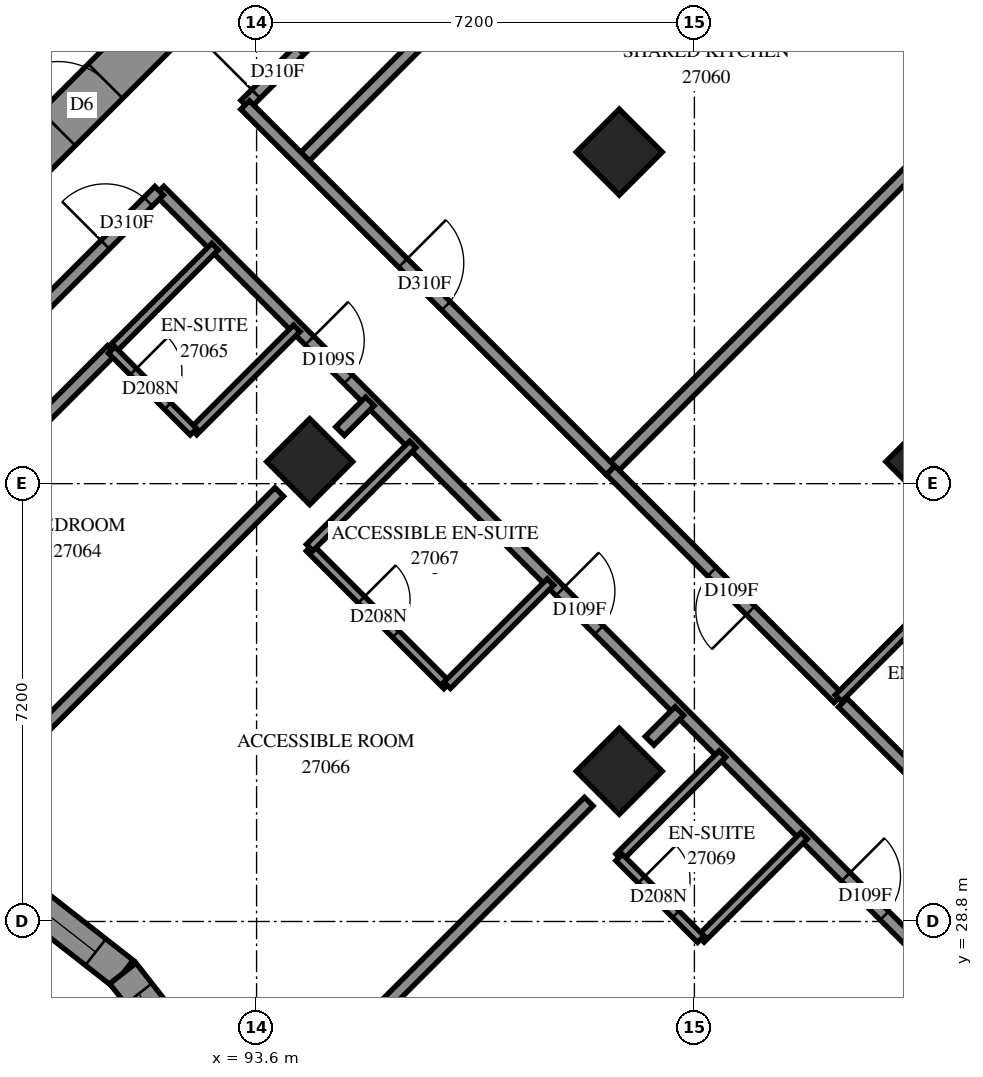
"""IFC4 building model, lengths in metres.
Left out: names, types, materials, properties, quantities, classifications, styles, units other than length and angle.
Written with IfcOpenShell. Run it as: python <this file> out.ifc"""

import sys

from ifc_helpers import new_model, si_unit, direction, frame, frame_2d, origin, origin_2d, place, context, subcontext, project, spatial, polyline, rectangle, outline, extrude, element, fill, save


model = new_model("IFC4")
c1 = context("Model", 3, precision=1e-05, world=origin(), true_north=direction((0.0, 1.0)))
c2 = subcontext(c1, "Body", "Model", "MODEL_VIEW")
j1 = project(units=[si_unit("LENGTHUNIT", "METRE"), si_unit("PLANEANGLEUNIT", "RADIAN")], contexts=[c1])
p1 = place(None, origin())
s1 = spatial("IfcSite", under=j1, at=p1, CompositionType="ELEMENT")
p2 = place(p1, origin())
s2 = spatial("IfcBuilding", under=s1, at=p2, CompositionType="ELEMENT")
p3 = place(p2, frame((0.0, 0.0, 101.6)))
s3 = spatial("IfcBuildingStorey", under=s2, at=p3, CompositionType="ELEMENT", Elevation=101.6)
for number, where, z_axis, x_axis in (
    (1, (99.565, 41.453, 0.0), (0.0, 0.0, 1.0), (0.707, -0.707, 0.0)),
    (2, (94.474, 36.362, 0.0), (0.0, 0.0, 1.0), (0.707, -0.707, 0.0)),
    (3, (104.656, 36.362, 0.0), (0.0, 0.0, 1.0), (0.707, -0.707, 0.0)),
    (4, (99.565, 31.271, 0.0), (0.0, 0.0, 1.0), (0.707, -0.707, 0.0)),
):
    element("IfcColumn", number, at=place(p3, frame(where, z_axis=z_axis, x_axis=x_axis)), inside=s3, PredefinedType="COLUMN", context=c2, shape_type="SweptSolid", body=[
        extrude(rectangle(XDim=1.0, YDim=1.0, at=origin_2d()), origin(), (0.0, 0.0, 1.0), 3.1),
    ])
p4 = place(p3, frame((87.12, 38.625, -0.3), z_axis=(0.0, 0.0, 1.0), x_axis=(0.7071067812, 0.7071067812, 0.0)))
e5 = element("IfcWall", 5, at=p4, inside=s3, PredefinedType="SHEAR", context=c2, shape_type="SweptSolid", body=[
    extrude(rectangle(XDim=14.4, YDim=0.8, at=frame_2d((7.2, 0.0))), origin(), (0.0, 0.0, 1.0), 2.7),
])
p5 = place(p4, frame((4.55, 0.0, 0.3)))
e6 = element("IfcOpeningElement", 6, at=p5, cuts=e5, PredefinedType="OPENING", context=c2, shape_type="SweptSolid", body=[
    extrude(rectangle(XDim=1.1, YDim=2.1, at=frame_2d((0.55, 1.05))), frame((0.0, 0.41, 0.0), z_axis=(0.0, -1.0, 0.0), x_axis=(1.0, 0.0, 0.0)), (0.0, 0.0, 1.0), 0.82),
])
p6 = place(p4, frame((11.35, 0.0, 0.3)))
e7 = element("IfcOpeningElement", 7, at=p6, cuts=e5, PredefinedType="OPENING", context=c2, shape_type="SweptSolid", body=[
    extrude(rectangle(XDim=1.1, YDim=2.1, at=frame_2d((0.55, 1.05))), frame((0.0, 0.41, 0.0), z_axis=(0.0, -1.0, 0.0), x_axis=(1.0, 0.0, 0.0)), (0.0, 0.0, 1.0), 0.82),
])
p7 = place(p3, frame((88.274, 30.392, 0.0), z_axis=(0.0, 0.0, 1.0), x_axis=(0.7877191588, -0.6160345176, 0.0)))
e8 = element("IfcWall", 8, at=p7, inside=s3, PredefinedType="SOLIDWALL", context=c2, shape_type="SweptSolid", body=[
    extrude(outline(polyline([(-0.034, -0.275), (3.936, -0.275), (4.004, 0.275), (0.034, 0.275), (-0.034, -0.275)])), origin(), (0.0, 0.0, 1.0), 3.1),
])
p8 = place(p7, frame((0.602, 0.0, 0.5)))
e9 = element("IfcOpeningElement", 9, at=p8, cuts=e8, PredefinedType="OPENING", context=c2, shape_type="SweptSolid", body=[
    extrude(rectangle(XDim=1.3, YDim=2.45, at=frame_2d((0.65, 1.225))), frame((0.0, 0.285, 0.0), z_axis=(0.0, -1.0, 0.0), x_axis=(1.0, 0.0, 0.0)), (0.0, 0.0, 1.0), 0.57),
])
p9 = place(p7, frame((2.102, 0.0, 0.5)))
e10 = element("IfcOpeningElement", 10, at=p9, cuts=e8, PredefinedType="OPENING", context=c2, shape_type="SweptSolid", body=[
    extrude(rectangle(XDim=1.3, YDim=2.45, at=frame_2d((0.65, 1.225))), frame((0.0, 0.285, 0.0), z_axis=(0.0, -1.0, 0.0), x_axis=(1.0, 0.0, 0.0)), (0.0, 0.0, 1.0), 0.57),
])
p10 = place(p3, frame((91.401, 27.947, 0.0), z_axis=(0.0, 0.0, 1.0), x_axis=(0.6160345176, -0.7877191588, 0.0)))
e11 = element("IfcWall", 11, at=p10, inside=s3, PredefinedType="SOLIDWALL", context=c2, shape_type="SweptSolid", body=[
    extrude(outline(polyline([(0.034, -0.275), (4.004, -0.275), (3.936, 0.275), (-0.034, 0.275), (0.034, -0.275)])), origin(), (0.0, 0.0, 1.0), 3.1),
])
p11 = place(p10, frame((0.424, 0.0, 0.5)))
e12 = element("IfcOpeningElement", 12, at=p11, cuts=e11, PredefinedType="OPENING", context=c2, shape_type="SweptSolid", body=[
    extrude(rectangle(XDim=1.3, YDim=2.45, at=frame_2d((0.65, 1.225))), frame((0.0, 0.285, 0.0), z_axis=(0.0, -1.0, 0.0), x_axis=(1.0, 0.0, 0.0)), (0.0, 0.0, 1.0), 0.57),
])
p12 = place(p10, frame((1.924, 0.0, 0.5)))
e13 = element("IfcOpeningElement", 13, at=p12, cuts=e11, PredefinedType="OPENING", context=c2, shape_type="SweptSolid", body=[
    extrude(rectangle(XDim=1.3, YDim=2.45, at=frame_2d((0.65, 1.225))), frame((0.0, 0.285, 0.0), z_axis=(0.0, -1.0, 0.0), x_axis=(1.0, 0.0, 0.0)), (0.0, 0.0, 1.0), 0.57),
])
p13 = place(p3, frame((92.004, 40.819, 0.0), z_axis=(0.0, 0.0, 1.0), x_axis=(0.7071067812, -0.7071067812, 0.0)))
e14 = element("IfcWall", 14, at=p13, inside=s3, PredefinedType="PARTITIONING", context=c2, shape_type="SweptSolid", body=[
    extrude(rectangle(XDim=19.298, YDim=0.2, at=frame_2d((9.649, 0.0))), origin(), (0.0, 0.0, 1.0), 3.1),
])
p14 = place(p13, frame((3.489, 0.0, 0.0)))
e15 = element("IfcOpeningElement", 15, at=p14, cuts=e14, PredefinedType="OPENING", context=c2, shape_type="SweptSolid", body=[
    extrude(rectangle(XDim=0.9, YDim=2.1, at=frame_2d((0.45, 1.05))), frame((0.0, 0.11, 0.0), z_axis=(0.0, -1.0, 0.0), x_axis=(1.0, 0.0, 0.0)), (0.0, 0.0, 1.0), 0.22),
])
p15 = place(p13, frame((9.319, 0.0, 0.0)))
e16 = element("IfcOpeningElement", 16, at=p15, cuts=e14, PredefinedType="OPENING", context=c2, shape_type="SweptSolid", body=[
    extrude(rectangle(XDim=0.9, YDim=2.1, at=frame_2d((0.45, 1.05))), frame((0.0, 0.11, 0.0), z_axis=(0.0, -1.0, 0.0), x_axis=(1.0, 0.0, 0.0)), (0.0, 0.0, 1.0), 0.22),
])
p16 = place(p13, frame((15.961, 0.0, 0.0)))
e17 = element("IfcOpeningElement", 17, at=p16, cuts=e14, PredefinedType="OPENING", context=c2, shape_type="SweptSolid", body=[
    extrude(rectangle(XDim=0.9, YDim=2.1, at=frame_2d((0.45, 1.05))), frame((0.0, 0.11, 0.0), z_axis=(0.0, -1.0, 0.0), x_axis=(1.0, 0.0, 0.0)), (0.0, 0.0, 1.0), 0.22),
])
p17 = place(p3, frame((99.423, 36.221, 0.0), z_axis=(0.0, 0.0, 1.0), x_axis=(0.7071067812, 0.7071067812, 0.0)))
e18 = element("IfcWall", 18, at=p17, inside=s3, PredefinedType="PARTITIONING", context=c2, shape_type="SweptSolid", body=[
    extrude(rectangle(XDim=12.072, YDim=0.2, at=frame_2d((6.036, 0.0))), origin(), (0.0, 0.0, 1.0), 3.1),
])
p18 = place(p3, frame((94.331, 41.313, 0.0), z_axis=(0.0, 0.0, 1.0), x_axis=(0.7071109413, 0.7071026211, 0.0)))
e19 = element("IfcWall", 19, at=p18, inside=s3, PredefinedType="PARTITIONING", context=c2, shape_type="SweptSolid", body=[
    extrude(rectangle(XDim=12.019, YDim=0.2, at=frame_2d((6.01, 0.0))), origin(), (0.0, 0.0, 1.0), 3.1),
])
p19 = place(p3, frame((93.413, 42.233, 0.0), z_axis=(0.0, 0.0, 1.0), x_axis=(0.7071067812, 0.7071067812, 0.0)))
e20 = element("IfcWall", 20, at=p19, inside=s3, PredefinedType="PARTITIONING", context=c2, shape_type="SweptSolid", body=[
    extrude(rectangle(XDim=9.699, YDim=0.2, at=frame_2d((4.849, 0.0))), origin(), (0.0, 0.0, 1.0), 3.1),
])
p20 = place(p19, frame((0.249, 0.0, 0.0)))
e21 = element("IfcOpeningElement", 21, at=p20, cuts=e20, PredefinedType="OPENING", context=c2, shape_type="SweptSolid", body=[
    extrude(rectangle(XDim=1.0, YDim=2.1, at=frame_2d((0.5, 1.05))), frame((0.0, 0.11, 0.0), z_axis=(0.0, -1.0, 0.0), x_axis=(1.0, 0.0, 0.0)), (0.0, 0.0, 1.0), 0.22),
])
p21 = place(p3, frame((93.411, 42.227, 0.0), z_axis=(0.0, 0.0, 1.0), x_axis=(0.7071067812, -0.7071067812, 0.0)))
e22 = element("IfcWall", 22, at=p21, inside=s3, PredefinedType="PARTITIONING", context=c2, shape_type="SweptSolid", body=[
    extrude(rectangle(XDim=8.499, YDim=0.2, at=frame_2d((4.25, 0.0))), origin(), (0.0, 0.0, 1.0), 3.1),
])
p22 = place(p21, frame((3.672, 0.0, 0.0)))
e23 = element("IfcOpeningElement", 23, at=p22, cuts=e22, PredefinedType="OPENING", context=c2, shape_type="SweptSolid", body=[
    extrude(rectangle(XDim=1.0, YDim=2.1, at=frame_2d((0.5, 1.05))), frame((0.0, 0.11, 0.0), z_axis=(0.0, -1.0, 0.0), x_axis=(1.0, 0.0, 0.0)), (0.0, 0.0, 1.0), 0.22),
])
p23 = place(p3, frame((86.835, 35.655, 0.0), z_axis=(0.0, 0.0, 1.0), x_axis=(0.7071067812, 0.7071067812, 0.0)))
e24 = element("IfcWall", 24, at=p23, inside=s3, PredefinedType="PARTITIONING", context=c2, shape_type="SweptSolid", body=[
    extrude(rectangle(XDim=7.3, YDim=0.2, at=frame_2d((3.65, 0.0))), origin(), (0.0, 0.0, 1.0), 3.1),
])
p24 = place(p23, frame((6.046, 0.0, 0.0)))
e25 = element("IfcOpeningElement", 25, at=p24, cuts=e24, PredefinedType="OPENING", context=c2, shape_type="SweptSolid", body=[
    extrude(rectangle(XDim=1.0, YDim=2.1, at=frame_2d((0.5, 1.05))), frame((0.0, 0.11, 0.0), z_axis=(0.0, -1.0, 0.0), x_axis=(1.0, 0.0, 0.0)), (0.0, 0.0, 1.0), 0.22),
])
p25 = place(p3, frame((86.337, 33.315, 0.0), z_axis=(0.0, 0.0, 1.0), x_axis=(0.7069692223, 0.7072443133, 0.0)))
e26 = element("IfcWall", 26, at=p25, inside=s3, PredefinedType="PARTITIONING", context=c2, shape_type="SweptSolid", body=[
    extrude(rectangle(XDim=6.907, YDim=0.2, at=frame_2d((3.453, 0.0))), origin(), (0.0, 0.0, 1.0), 3.1),
])
p26 = place(p3, frame((89.881, 31.771, 0.0), z_axis=(0.0, 0.0, 1.0), x_axis=(0.7071067812, 0.7071067812, 0.0)))
e27 = element("IfcWall", 27, at=p26, inside=s3, PredefinedType="PARTITIONING", context=c2, shape_type="SweptSolid", body=[
    extrude(rectangle(XDim=5.787, YDim=0.2, at=frame_2d((2.893, 0.0))), origin(), (0.0, 0.0, 1.0), 3.1),
])
p27 = place(p3, frame((94.973, 26.681, 0.0), z_axis=(0.0, 0.0, 1.0), x_axis=(0.7071067812, 0.7071067812, 0.0)))
e28 = element("IfcWall", 28, at=p27, inside=s3, PredefinedType="PARTITIONING", context=c2, shape_type="SweptSolid", body=[
    extrude(rectangle(XDim=5.784, YDim=0.2, at=frame_2d((2.892, 0.0))), origin(), (0.0, 0.0, 1.0), 3.1),
])
p28 = place(p3, frame((103.239, 32.399, 0.0), z_axis=(0.0, 0.0, 1.0), x_axis=(0.7071067812, -0.7071067812, 0.0)))
e29 = element("IfcWall", 29, at=p28, inside=s3, PredefinedType="PARTITIONING", context=c2, shape_type="SweptSolid", body=[
    extrude(rectangle(XDim=5.399, YDim=0.2, at=frame_2d((2.7, 0.0))), origin(), (0.0, 0.0, 1.0), 3.1),
])
p29 = place(p28, frame((2.15, 0.0, 0.0)))
e30 = element("IfcOpeningElement", 30, at=p29, cuts=e29, PredefinedType="OPENING", context=c2, shape_type="SweptSolid", body=[
    extrude(rectangle(XDim=0.9, YDim=2.1, at=frame_2d((0.45, 1.05))), frame((0.0, 0.11, 0.0), z_axis=(0.0, -1.0, 0.0), x_axis=(1.0, 0.0, 0.0)), (0.0, 0.0, 1.0), 0.22),
])
p30 = place(p3, frame((103.168, 32.47, 0.0), z_axis=(0.0, 0.0, 1.0), x_axis=(-0.7067858967, 0.7074275201, 0.0)))
e31 = element("IfcWall", 31, at=p30, inside=s3, PredefinedType="PARTITIONING", context=c2, shape_type="SweptSolid", body=[
    extrude(rectangle(XDim=5.299, YDim=0.2, at=frame_2d((2.65, 0.0))), origin(), (0.0, 0.0, 1.0), 3.1),
])
p31 = place(p30, frame((2.043, 0.0, 0.0)))
e32 = element("IfcOpeningElement", 32, at=p31, cuts=e31, PredefinedType="OPENING", context=c2, shape_type="SweptSolid", body=[
    extrude(rectangle(XDim=0.9, YDim=2.1, at=frame_2d((0.45, 1.05))), frame((0.0, 0.11, 0.0), z_axis=(0.0, -1.0, 0.0), x_axis=(1.0, 0.0, 0.0)), (0.0, 0.0, 1.0), 0.22),
])
p32 = place(p3, frame((94.471, 34.945, 0.0), z_axis=(0.0, 0.0, 1.0), x_axis=(0.7067942478, -0.7074191764, 0.0)))
e33 = element("IfcWall", 33, at=p32, inside=s3, PredefinedType="PARTITIONING", context=c2, shape_type="SweptSolid", body=[
    extrude(rectangle(XDim=3.2, YDim=0.15, at=frame_2d((1.6, 0.0))), origin(), (0.0, 0.0, 1.0), 3.1),
])
p33 = place(p32, frame((1.206, 0.0, 0.0)))
e34 = element("IfcOpeningElement", 34, at=p33, cuts=e33, PredefinedType="OPENING", context=c2, shape_type="SweptSolid", body=[
    extrude(rectangle(XDim=0.8, YDim=2.1, at=frame_2d((0.4, 1.05))), frame((0.0, 0.085, 0.0), z_axis=(0.0, -1.0, 0.0), x_axis=(1.0, 0.0, 0.0)), (0.0, 0.0, 1.0), 0.17),
])
for number, where, z_axis, x_axis in (
    (35, (92.563, 36.857, 0.0), (0.0, 0.0, 1.0), (0.707, 0.707, 0.0)),
    (36, (91.219, 38.201, 0.0), (0.0, 0.0, 1.0), (0.707, 0.707, 0.0)),
    (37, (96.735, 32.685, 0.0), (0.0, 0.0, 1.0), (0.707, 0.707, 0.0)),
    (38, (103.169, 32.473, 0.0), (0.0, 0.0, 1.0), (0.707, 0.707, 0.0)),
    (39, (99.563, 29.857, 0.0), (0.0, 0.0, 1.0), (0.707, 0.707, 0.0)),
    (40, (100.907, 28.513, 0.0), (0.0, 0.0, 1.0), (0.707, 0.707, 0.0)),
):
    element("IfcWall", number, at=place(p3, frame(where, z_axis=z_axis, x_axis=x_axis)), inside=s3, PredefinedType="PARTITIONING", context=c2, shape_type="SweptSolid", body=[
        extrude(rectangle(XDim=2.401, YDim=0.15, at=frame_2d((1.201, 0.0))), origin(), (0.0, 0.0, 1.0), 3.1),
    ])
p34 = place(p3, frame((94.473, 34.949, 0.0), z_axis=(0.0, 0.0, 1.0), x_axis=(0.7071067812, 0.7071067812, 0.0)))
e41 = element("IfcWall", 41, at=p34, inside=s3, PredefinedType="PARTITIONING", context=c2, shape_type="SweptSolid", body=[
    extrude(rectangle(XDim=2.398, YDim=0.15, at=frame_2d((1.199, 0.0))), origin(), (0.0, 0.0, 1.0), 3.1),
])
p35 = place(p3, frame((99.561, 29.853, 0.0), z_axis=(0.0, 0.0, 1.0), x_axis=(0.7071067812, -0.7071067812, 0.0)))
e42 = element("IfcWall", 42, at=p35, inside=s3, PredefinedType="PARTITIONING", context=c2, shape_type="SweptSolid", body=[
    extrude(rectangle(XDim=1.901, YDim=0.15, at=frame_2d((0.95, 0.0))), origin(), (0.0, 0.0, 1.0), 3.1),
])
p36 = place(p35, frame((0.519, 0.0, 0.0)))
e43 = element("IfcOpeningElement", 43, at=p36, cuts=e42, PredefinedType="OPENING", context=c2, shape_type="SweptSolid", body=[
    extrude(rectangle(XDim=0.8, YDim=2.1, at=frame_2d((0.4, 1.05))), frame((0.0, 0.085, 0.0), z_axis=(0.0, -1.0, 0.0), x_axis=(1.0, 0.0, 0.0)), (0.0, 0.0, 1.0), 0.17),
])
p37 = place(p3, frame((91.217, 38.197, 0.0), z_axis=(0.0, 0.0, 1.0), x_axis=(0.7071067812, -0.7071067812, 0.0)))
e44 = element("IfcWall", 44, at=p37, inside=s3, PredefinedType="PARTITIONING", context=c2, shape_type="SweptSolid", body=[
    extrude(rectangle(XDim=1.901, YDim=0.15, at=frame_2d((0.95, 0.0))), origin(), (0.0, 0.0, 1.0), 3.1),
])
p38 = place(p37, frame((0.502, 0.0, 0.0)))
e45 = element("IfcOpeningElement", 45, at=p38, cuts=e44, PredefinedType="OPENING", context=c2, shape_type="SweptSolid", body=[
    extrude(rectangle(XDim=0.8, YDim=2.1, at=frame_2d((0.4, 1.05))), frame((0.0, 0.085, 0.0), z_axis=(0.0, -1.0, 0.0), x_axis=(1.0, 0.0, 0.0)), (0.0, 0.0, 1.0), 0.17),
])
for number, where, z_axis, x_axis in (
    (46, (94.973, 36.863, 0.0), (0.0, 0.0, 1.0), (0.707, 0.707, 0.0)),
    (47, (100.063, 31.771, 0.0), (0.0, 0.0, 1.0), (0.707, 0.707, 0.0)),
):
    element("IfcWall", number, at=place(p3, frame(where, z_axis=z_axis, x_axis=x_axis)), inside=s3, PredefinedType="PARTITIONING", context=c2, shape_type="SweptSolid", body=[
        extrude(rectangle(XDim=0.693, YDim=0.2, at=frame_2d((0.346, 0.0))), origin(), (0.0, 0.0, 1.0), 3.1),
    ])
p39 = place(p9, origin())
e48 = element("IfcWindow", 48, at=p39, inside=s3, PartitioningType="SINGLE_PANEL", PredefinedType="WINDOW", context=c2, shape_type="SweptSolid", body=[
    extrude(rectangle(XDim=1.3, YDim=2.45, at=frame_2d((0.65, 1.225))), frame((0.0, 0.155, 0.0), z_axis=(0.0, -1.0, 0.0), x_axis=(1.0, 0.0, 0.0)), (0.0, 0.0, 1.0), 0.06),
])
fill(e10, e48)
p40 = place(p11, origin())
e49 = element("IfcWindow", 49, at=p40, inside=s3, PartitioningType="SINGLE_PANEL", PredefinedType="WINDOW", context=c2, shape_type="SweptSolid", body=[
    extrude(rectangle(XDim=1.3, YDim=2.45, at=frame_2d((0.65, 1.225))), frame((0.0, 0.155, 0.0), z_axis=(0.0, -1.0, 0.0), x_axis=(1.0, 0.0, 0.0)), (0.0, 0.0, 1.0), 0.06),
])
fill(e12, e49)
p41 = place(p5, origin())
e50 = element("IfcDoor", 50, at=p41, inside=s3, OperationType="DOUBLE_DOOR_SINGLE_SWING", PredefinedType="DOOR", context=c2, shape_type="SweptSolid", body=[
    extrude(rectangle(XDim=1.1, YDim=2.1, at=frame_2d((0.55, 1.05))), frame((0.0, 0.025, 0.0), z_axis=(0.0, -1.0, 0.0), x_axis=(1.0, 0.0, 0.0)), (0.0, 0.0, 1.0), 0.05),
])
fill(e6, e50)
p42 = place(p20, origin())
e51 = element("IfcDoor", 51, at=p42, inside=s3, OperationType="SINGLE_SWING_LEFT", PredefinedType="DOOR", context=c2, shape_type="SweptSolid", body=[
    extrude(rectangle(XDim=1.0, YDim=2.1, at=frame_2d((0.5, 1.05))), frame((0.0, 0.025, 0.0), z_axis=(0.0, -1.0, 0.0), x_axis=(1.0, 0.0, 0.0)), (0.0, 0.0, 1.0), 0.05),
])
fill(e21, e51)
p43 = place(p22, origin())
e52 = element("IfcDoor", 52, at=p43, inside=s3, OperationType="SINGLE_SWING_RIGHT", PredefinedType="DOOR", context=c2, shape_type="SweptSolid", body=[
    extrude(rectangle(XDim=1.0, YDim=2.1, at=frame_2d((0.5, 1.05))), frame((0.0, 0.025, 0.0), z_axis=(0.0, -1.0, 0.0), x_axis=(1.0, 0.0, 0.0)), (0.0, 0.0, 1.0), 0.05),
])
fill(e23, e52)
p44 = place(p31, origin())
e53 = element("IfcDoor", 53, at=p44, inside=s3, OperationType="SINGLE_SWING_RIGHT", PredefinedType="DOOR", context=c2, shape_type="SweptSolid", body=[
    extrude(rectangle(XDim=0.9, YDim=2.1, at=frame_2d((0.45, 1.05))), frame((0.0, 0.025, 0.0), z_axis=(0.0, -1.0, 0.0), x_axis=(1.0, 0.0, 0.0)), (0.0, 0.0, 1.0), 0.05),
])
fill(e32, e53)
p45 = place(p24, origin())
e54 = element("IfcDoor", 54, at=p45, inside=s3, OperationType="SINGLE_SWING_RIGHT", PredefinedType="DOOR", context=c2, shape_type="SweptSolid", body=[
    extrude(rectangle(XDim=1.0, YDim=2.1, at=frame_2d((0.5, 1.05))), frame((0.0, 0.025, 0.0), z_axis=(0.0, -1.0, 0.0), x_axis=(1.0, 0.0, 0.0)), (0.0, 0.0, 1.0), 0.05),
])
fill(e25, e54)
p46 = place(p14, origin())
e55 = element("IfcDoor", 55, at=p46, inside=s3, OperationType="SINGLE_SWING_LEFT", PredefinedType="DOOR", context=c2, shape_type="SweptSolid", body=[
    extrude(rectangle(XDim=0.9, YDim=2.1, at=frame_2d((0.45, 1.05))), frame((0.0, 0.025, 0.0), z_axis=(0.0, -1.0, 0.0), x_axis=(1.0, 0.0, 0.0)), (0.0, 0.0, 1.0), 0.05),
])
fill(e15, e55)
p47 = place(p38, origin())
e56 = element("IfcDoor", 56, at=p47, inside=s3, OperationType="SINGLE_SWING_RIGHT", PredefinedType="DOOR", context=c2, shape_type="SweptSolid", body=[
    extrude(rectangle(XDim=0.8, YDim=2.1, at=frame_2d((0.4, 1.05))), frame((0.0, 0.025, 0.0), z_axis=(0.0, -1.0, 0.0), x_axis=(1.0, 0.0, 0.0)), (0.0, 0.0, 1.0), 0.05),
])
fill(e45, e56)
p48 = place(p15, origin())
e57 = element("IfcDoor", 57, at=p48, inside=s3, OperationType="SINGLE_SWING_RIGHT", PredefinedType="DOOR", context=c2, shape_type="SweptSolid", body=[
    extrude(rectangle(XDim=0.9, YDim=2.1, at=frame_2d((0.45, 1.05))), frame((0.0, 0.025, 0.0), z_axis=(0.0, -1.0, 0.0), x_axis=(1.0, 0.0, 0.0)), (0.0, 0.0, 1.0), 0.05),
])
fill(e16, e57)
p49 = place(p33, origin())
e58 = element("IfcDoor", 58, at=p49, inside=s3, OperationType="SINGLE_SWING_RIGHT", PredefinedType="DOOR", context=c2, shape_type="SweptSolid", body=[
    extrude(rectangle(XDim=0.8, YDim=2.1, at=frame_2d((0.4, 1.05))), frame((0.0, 0.025, 0.0), z_axis=(0.0, -1.0, 0.0), x_axis=(1.0, 0.0, 0.0)), (0.0, 0.0, 1.0), 0.05),
])
fill(e34, e58)
p50 = place(p16, origin())
e59 = element("IfcDoor", 59, at=p50, inside=s3, OperationType="SINGLE_SWING_RIGHT", PredefinedType="DOOR", context=c2, shape_type="SweptSolid", body=[
    extrude(rectangle(XDim=0.9, YDim=2.1, at=frame_2d((0.45, 1.05))), frame((0.0, 0.025, 0.0), z_axis=(0.0, -1.0, 0.0), x_axis=(1.0, 0.0, 0.0)), (0.0, 0.0, 1.0), 0.05),
])
fill(e17, e59)
p51 = place(p36, origin())
e60 = element("IfcDoor", 60, at=p51, inside=s3, OperationType="SINGLE_SWING_RIGHT", PredefinedType="DOOR", context=c2, shape_type="SweptSolid", body=[
    extrude(rectangle(XDim=0.8, YDim=2.1, at=frame_2d((0.4, 1.05))), frame((0.0, 0.025, 0.0), z_axis=(0.0, -1.0, 0.0), x_axis=(1.0, 0.0, 0.0)), (0.0, 0.0, 1.0), 0.05),
])
fill(e43, e60)
save(model, sys.argv[1])
